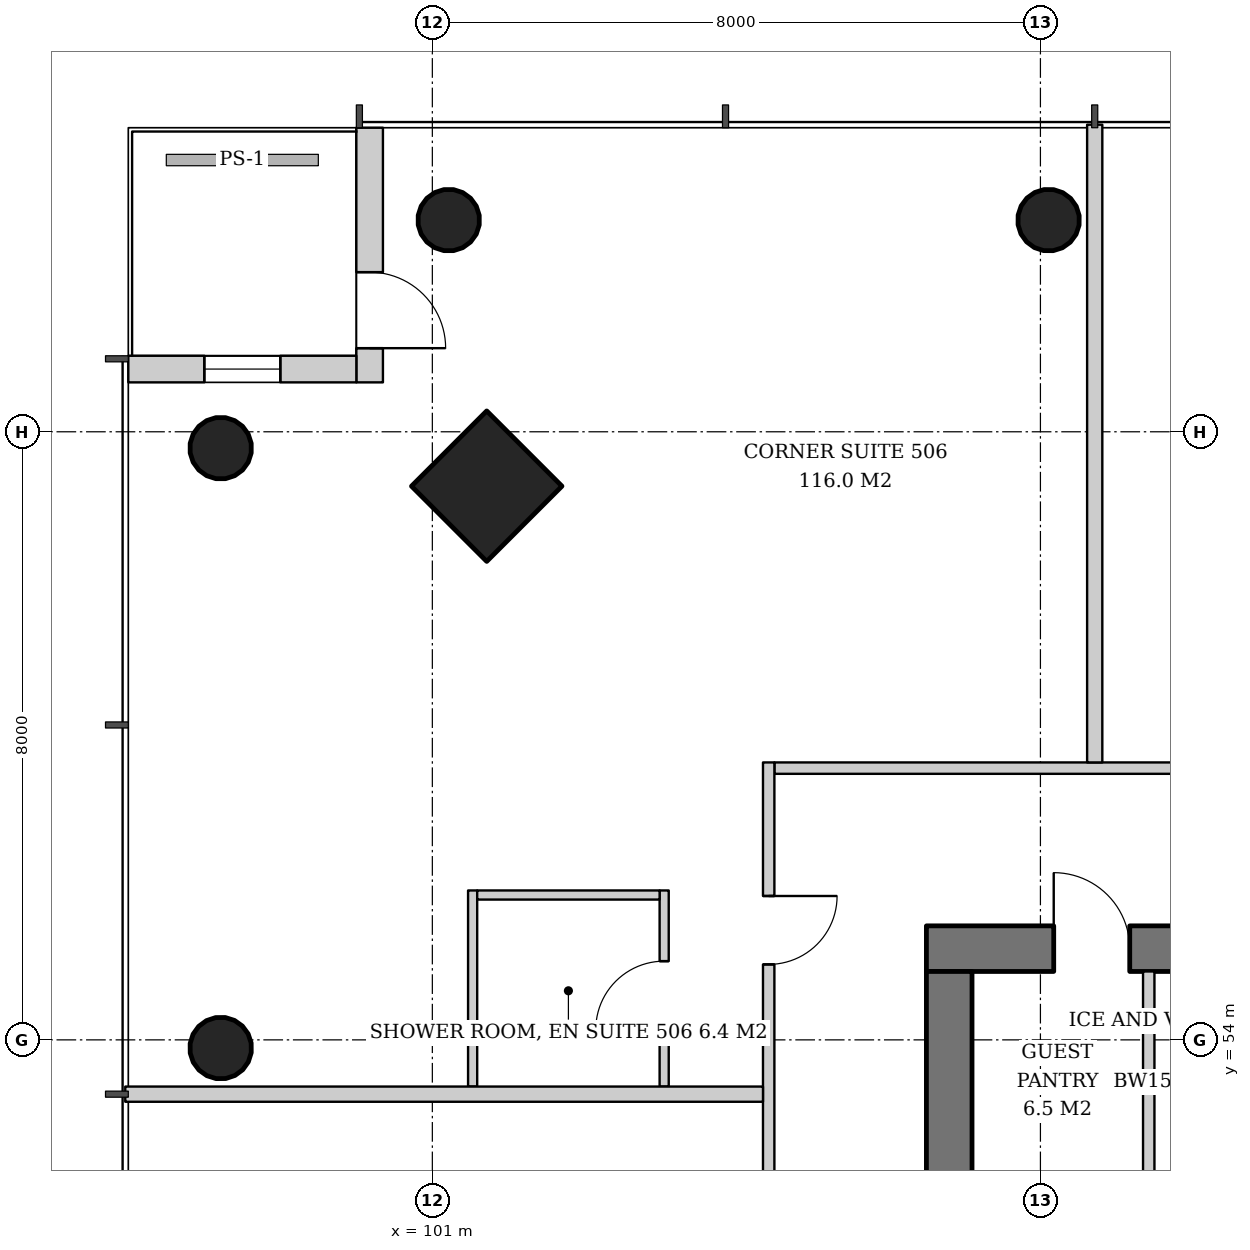
"""IFC4 building model, lengths in metres.
Left out: names, types, materials, properties, quantities, classifications, styles, units other than length and angle.
Written with IfcOpenShell. Run it as: python <this file> out.ifc"""

import sys

from ifc_helpers import new_model, si_unit, direction, frame, frame_2d, origin, origin_2d, place, context, subcontext, project, spatial, rectangle, hollow_circle, extrude, element, fill, save


model = new_model("IFC4")
c1 = context("Model", 3, precision=1e-05, world=origin(), true_north=direction((0.0, 1.0)))
c2 = subcontext(c1, "Body", "Model", "MODEL_VIEW")
j1 = project(units=[si_unit("LENGTHUNIT", "METRE"), si_unit("PLANEANGLEUNIT", "RADIAN")], contexts=[c1])
p1 = place(None, origin())
s1 = spatial("IfcSite", under=j1, at=p1, CompositionType="ELEMENT")
p2 = place(p1, origin())
s2 = spatial("IfcBuilding", under=s1, at=p2, CompositionType="ELEMENT")
p3 = place(p2, frame((0.0, 0.0, 24.8)))
s3 = spatial("IfcBuildingStorey", under=s2, at=p3, CompositionType="ELEMENT", Elevation=24.8)
p4 = place(p3, frame((101.664, 61.336, 0.0), z_axis=(0.043029647111, -0.043029647111, 0.998146732169), x_axis=(0.707106781187, 0.707106781187, 0.0)))
e1 = element("IfcColumn", 1, at=p4, inside=s3, PredefinedType="COLUMN", context=c2, shape_type="SweptSolid", body=[
    extrude(rectangle(XDim=1.4, YDim=1.4, at=origin_2d()), origin(), (0.0, 0.0, 1.0), 3.807),
])
p5 = place(p3, frame((101.164, 64.836, 0.0), z_axis=(0.043029647111, -0.043029647111, 0.998146732169), x_axis=(0.707106781187, 0.707106781187, 0.0)))
e2 = element("IfcColumn", 2, at=p5, inside=s3, PredefinedType="COLUMN", context=c2, shape_type="SweptSolid", body=[
    extrude(hollow_circle(Radius=0.406, WallThickness=0.03, at=origin_2d()), origin(), (0.0, 0.0, 1.0), 3.807),
])
p6 = place(p3, frame((109.082, 64.836, 0.0), z_axis=(0.021561848751, -0.043059525333, 0.998839808957), x_axis=(0.894160516368, 0.44774654769, 0.0)))
e3 = element("IfcColumn", 3, at=p6, inside=s3, PredefinedType="COLUMN", context=c2, shape_type="SweptSolid", body=[
    extrude(hollow_circle(Radius=0.406, WallThickness=0.03, at=origin_2d()), origin(), (0.0, 0.0, 1.0), 3.804),
])
p7 = place(p3, frame((98.164, 61.836, 0.0), z_axis=(0.043029647111, -0.043029647111, 0.998146732169), x_axis=(0.707106781187, 0.707106781187, 0.0)))
e4 = element("IfcColumn", 4, at=p7, inside=s3, PredefinedType="COLUMN", context=c2, shape_type="SweptSolid", body=[
    extrude(hollow_circle(Radius=0.406, WallThickness=0.03, at=origin_2d()), origin(), (0.0, 0.0, 1.0), 3.807),
])
p8 = place(p3, frame((98.164, 53.918, 0.0), z_axis=(0.043059525333, -0.021561848751, 0.998839808957), x_axis=(0.44774654769, 0.894160516368, 0.0)))
e5 = element("IfcColumn", 5, at=p8, inside=s3, PredefinedType="COLUMN", context=c2, shape_type="SweptSolid", body=[
    extrude(hollow_circle(Radius=0.406, WallThickness=0.03, at=origin_2d()), origin(), (0.0, 0.0, 1.0), 3.804),
])
p9 = place(p3, frame((107.5, 55.2, 0.0), z_axis=(0.0, 0.0, 1.0), x_axis=(1.0, 0.0, 0.0)))
e6 = element("IfcWall", 6, at=p9, inside=s3, PredefinedType="SHEAR", context=c2, shape_type="SweptSolid", body=[
    extrude(rectangle(XDim=19.0, YDim=0.6, at=frame_2d((9.5, 0.0))), origin(), (0.0, 0.0, 1.0), 3.8),
])
p10 = place(p9, frame((14.14, 0.0, 0.0)))
e7 = element("IfcOpeningElement", 7, at=p10, cuts=e6, PredefinedType="OPENING", context=c2, shape_type="SweptSolid", body=[
    extrude(rectangle(XDim=1.0, YDim=2.1, at=frame_2d((0.5, 1.05))), frame((0.0, 0.31, 0.0), z_axis=(0.0, -1.0, 0.0), x_axis=(1.0, 0.0, 0.0)), (0.0, 0.0, 1.0), 0.62),
])
p11 = place(p9, frame((1.675, 0.0, 0.0)))
e8 = element("IfcOpeningElement", 8, at=p11, cuts=e6, PredefinedType="OPENING", context=c2, shape_type="SweptSolid", body=[
    extrude(rectangle(XDim=1.0, YDim=2.1, at=frame_2d((0.5, 1.05))), frame((0.0, 0.31, 0.0), z_axis=(0.0, -1.0, 0.0), x_axis=(1.0, 0.0, 0.0)), (0.0, 0.0, 1.0), 0.62),
])
p12 = place(p9, frame((3.587, 0.0, 0.0)))
e9 = element("IfcOpeningElement", 9, at=p12, cuts=e6, PredefinedType="OPENING", context=c2, shape_type="SweptSolid", body=[
    extrude(rectangle(XDim=1.0, YDim=2.1, at=frame_2d((0.5, 1.05))), frame((0.0, 0.31, 0.0), z_axis=(0.0, -1.0, 0.0), x_axis=(1.0, 0.0, 0.0)), (0.0, 0.0, 1.0), 0.62),
])
p13 = place(p3, frame((107.8, 37.1, 0.0), z_axis=(0.0, 0.0, 1.0), x_axis=(0.0, 1.0, 0.0)))
e10 = element("IfcWall", 10, at=p13, inside=s3, PredefinedType="SHEAR", context=c2, shape_type="SweptSolid", body=[
    extrude(rectangle(XDim=17.8, YDim=0.6, at=frame_2d((8.9, 0.0))), origin(), (0.0, 0.0, 1.0), 3.8),
])
p14 = place(p13, frame((8.0, 0.0, 0.0)))
e11 = element("IfcOpeningElement", 11, at=p14, cuts=e10, PredefinedType="OPENING", context=c2, shape_type="SweptSolid", body=[
    extrude(rectangle(XDim=1.8, YDim=2.4, at=frame_2d((0.9, 1.2))), frame((0.0, 0.31, 0.0), z_axis=(0.0, -1.0, 0.0), x_axis=(1.0, 0.0, 0.0)), (0.0, 0.0, 1.0), 0.62),
])
p15 = place(p3, frame((100.175, 66.0, 0.0), z_axis=(0.0, 0.0, 1.0), x_axis=(0.0, -1.0, 0.0)))
e12 = element("IfcWall", 12, at=p15, inside=s3, PredefinedType="SOLIDWALL", context=c2, shape_type="SweptSolid", body=[
    extrude(rectangle(XDim=3.35, YDim=0.35, at=frame_2d((1.675, 0.0))), origin(), (0.0, 0.0, 1.0), 3.6),
])
p16 = place(p15, frame((1.9, 0.0, 0.0)))
e13 = element("IfcOpeningElement", 13, at=p16, cuts=e12, PredefinedType="OPENING", context=c2, shape_type="SweptSolid", body=[
    extrude(rectangle(XDim=1.0, YDim=2.4, at=frame_2d((0.5, 1.2))), frame((0.0, 0.185, 0.0), z_axis=(0.0, -1.0, 0.0), x_axis=(1.0, 0.0, 0.0)), (0.0, 0.0, 1.0), 0.37),
])
p17 = place(p3, frame((100.0, 62.825, 0.0), z_axis=(0.0, 0.0, 1.0), x_axis=(-1.0, 0.0, 0.0)))
e14 = element("IfcWall", 14, at=p17, inside=s3, PredefinedType="SOLIDWALL", context=c2, shape_type="SweptSolid", body=[
    extrude(rectangle(XDim=3.0, YDim=0.35, at=frame_2d((1.5, 0.0))), origin(), (0.0, 0.0, 1.0), 3.6),
])
p18 = place(p17, frame((1.0, 0.0, 0.9)))
e15 = element("IfcOpeningElement", 15, at=p18, cuts=e14, PredefinedType="OPENING", context=c2, shape_type="SweptSolid", body=[
    extrude(rectangle(XDim=1.0, YDim=2.4, at=frame_2d((0.5, 1.2))), frame((0.0, 0.185, 0.0), z_axis=(0.0, -1.0, 0.0), x_axis=(1.0, 0.0, 0.0)), (0.0, 0.0, 1.0), 0.37),
])
p19 = place(p3, frame((110.425, 52.0, 0.0), z_axis=(0.0, 0.0, 1.0), x_axis=(0.0, 1.0, 0.0)))
e16 = element("IfcWall", 16, at=p19, inside=s3, PredefinedType="SOLIDWALL", context=c2, shape_type="SweptSolid", body=[
    extrude(rectangle(XDim=2.9, YDim=0.15, at=frame_2d((1.45, 0.0))), origin(), (0.0, 0.0, 1.0), 3.6),
])
p20 = place(p3, frame((128.65, 57.575, 0.0), z_axis=(0.0, 0.0, 1.0), x_axis=(-1.0, 0.0, 0.0)))
e17 = element("IfcWall", 17, at=p20, inside=s3, PredefinedType="PARTITIONING", context=c2, shape_type="SweptSolid", body=[
    extrude(rectangle(XDim=23.15, YDim=0.15, at=frame_2d((11.575, 0.0))), origin(), (0.0, 0.0, 1.0), 2.8),
])
p21 = place(p20, frame((1.757, 0.0, 0.0)))
e18 = element("IfcOpeningElement", 18, at=p21, cuts=e17, PredefinedType="OPENING", context=c2, shape_type="SweptSolid", body=[
    extrude(rectangle(XDim=0.9, YDim=2.1, at=frame_2d((0.45, 1.05))), frame((0.0, 0.085, 0.0), z_axis=(0.0, -1.0, 0.0), x_axis=(1.0, 0.0, 0.0)), (0.0, 0.0, 1.0), 0.17),
])
p22 = place(p20, frame((5.572, 0.0, 0.0)))
e19 = element("IfcOpeningElement", 19, at=p22, cuts=e17, PredefinedType="OPENING", context=c2, shape_type="SweptSolid", body=[
    extrude(rectangle(XDim=0.9, YDim=2.1, at=frame_2d((0.45, 1.05))), frame((0.0, 0.085, 0.0), z_axis=(0.0, -1.0, 0.0), x_axis=(1.0, 0.0, 0.0)), (0.0, 0.0, 1.0), 0.17),
])
p23 = place(p20, frame((11.921, 0.0, 0.0)))
e20 = element("IfcOpeningElement", 20, at=p23, cuts=e17, PredefinedType="OPENING", context=c2, shape_type="SweptSolid", body=[
    extrude(rectangle(XDim=1.0, YDim=2.1, at=frame_2d((0.5, 1.05))), frame((0.0, 0.085, 0.0), z_axis=(0.0, -1.0, 0.0), x_axis=(1.0, 0.0, 0.0)), (0.0, 0.0, 1.0), 0.17),
])
p24 = place(p3, frame((109.714, 57.65, 0.0), z_axis=(0.0, 0.0, 1.0), x_axis=(0.0, 1.0, 0.0)))
e21 = element("IfcWall", 21, at=p24, inside=s3, PredefinedType="PARTITIONING", context=c2, shape_type="SweptSolid", body=[
    extrude(rectangle(XDim=8.39, YDim=0.2, at=frame_2d((4.195, 0.0))), origin(), (0.0, 0.0, 1.0), 3.05),
])
p25 = place(p3, frame((104.05, 53.386, 0.0), z_axis=(0.0, 0.0, 1.0), x_axis=(0.0, 1.0, 0.0)))
e22 = element("IfcWall", 22, at=p25, inside=s3, PredefinedType="PARTITIONING", context=c2, shape_type="SweptSolid", body=[
    extrude(rectangle(XDim=2.58, YDim=0.12, at=frame_2d((1.29, 0.0))), origin(), (0.0, 0.0, 1.0), 2.8),
])
p26 = place(p25, frame((0.75, 0.0, 0.0)))
e23 = element("IfcOpeningElement", 23, at=p26, cuts=e22, PredefinedType="OPENING", context=c2, shape_type="SweptSolid", body=[
    extrude(rectangle(XDim=0.9, YDim=2.1, at=frame_2d((0.45, 1.05))), frame((0.0, 0.07, 0.0), z_axis=(0.0, -1.0, 0.0), x_axis=(1.0, 0.0, 0.0)), (0.0, 0.0, 1.0), 0.14),
])
p27 = place(p3, frame((101.53, 53.386, 0.0), z_axis=(0.0, 0.0, 1.0), x_axis=(0.0, 1.0, 0.0)))
e24 = element("IfcWall", 24, at=p27, inside=s3, PredefinedType="PARTITIONING", context=c2, shape_type="SweptSolid", body=[
    extrude(rectangle(XDim=2.58, YDim=0.12, at=frame_2d((1.29, 0.0))), origin(), (0.0, 0.0, 1.0), 2.8),
])
p28 = place(p3, frame((103.99, 55.906, 0.0), z_axis=(0.0, 0.0, 1.0), x_axis=(-1.0, 0.0, 0.0)))
e25 = element("IfcWall", 25, at=p28, inside=s3, PredefinedType="PARTITIONING", context=c2, shape_type="SweptSolid", body=[
    extrude(rectangle(XDim=2.4, YDim=0.12, at=frame_2d((1.2, 0.0))), origin(), (0.0, 0.0, 1.0), 2.847),
])
p29 = place(p3, frame((105.425, 57.65, 0.0), z_axis=(0.0, 0.0, 1.0), x_axis=(0.0, -1.0, 0.0)))
e26 = element("IfcWall", 26, at=p29, inside=s3, PredefinedType="PARTITIONING", context=c2, shape_type="SweptSolid", body=[
    extrude(rectangle(XDim=23.15, YDim=0.15, at=frame_2d((11.575, 0.0))), origin(), (0.0, 0.0, 1.0), 2.8),
])
p30 = place(p29, frame((1.757, 0.0, 0.0)))
e27 = element("IfcOpeningElement", 27, at=p30, cuts=e26, PredefinedType="OPENING", context=c2, shape_type="SweptSolid", body=[
    extrude(rectangle(XDim=0.9, YDim=2.1, at=frame_2d((0.45, 1.05))), frame((0.0, 0.085, 0.0), z_axis=(0.0, -1.0, 0.0), x_axis=(1.0, 0.0, 0.0)), (0.0, 0.0, 1.0), 0.17),
])
p31 = place(p29, frame((7.064, 0.0, 0.0)))
e28 = element("IfcOpeningElement", 28, at=p31, cuts=e26, PredefinedType="OPENING", context=c2, shape_type="SweptSolid", body=[
    extrude(rectangle(XDim=1.0, YDim=2.1, at=frame_2d((0.5, 1.05))), frame((0.0, 0.085, 0.0), z_axis=(0.0, -1.0, 0.0), x_axis=(1.0, 0.0, 0.0)), (0.0, 0.0, 1.0), 0.17),
])
p32 = place(p29, frame((10.428, 0.0, 0.0)))
e29 = element("IfcOpeningElement", 29, at=p32, cuts=e26, PredefinedType="OPENING", context=c2, shape_type="SweptSolid", body=[
    extrude(rectangle(XDim=0.9, YDim=2.1, at=frame_2d((0.45, 1.05))), frame((0.0, 0.085, 0.0), z_axis=(0.0, -1.0, 0.0), x_axis=(1.0, 0.0, 0.0)), (0.0, 0.0, 1.0), 0.17),
])
p33 = place(p29, frame((16.829, 0.0, 0.0)))
e30 = element("IfcOpeningElement", 30, at=p33, cuts=e26, PredefinedType="OPENING", context=c2, shape_type="SweptSolid", body=[
    extrude(rectangle(XDim=0.9, YDim=2.1, at=frame_2d((0.45, 1.05))), frame((0.0, 0.085, 0.0), z_axis=(0.0, -1.0, 0.0), x_axis=(1.0, 0.0, 0.0)), (0.0, 0.0, 1.0), 0.17),
])
p34 = place(p3, frame((105.35, 53.286, 0.0), z_axis=(0.0, 0.0, 1.0), x_axis=(-1.0, 0.0, 0.0)))
e31 = element("IfcWall", 31, at=p34, inside=s3, PredefinedType="PARTITIONING", context=c2, shape_type="SweptSolid", body=[
    extrude(rectangle(XDim=8.39, YDim=0.2, at=frame_2d((4.195, 0.0))), origin(), (0.0, 0.0, 1.0), 3.05),
])
p35 = place(p16, origin())
e32 = element("IfcDoor", 32, at=p35, inside=s3, OperationType="SINGLE_SWING_RIGHT", PredefinedType="DOOR", context=c2, shape_type="SweptSolid", body=[
    extrude(rectangle(XDim=1.0, YDim=2.4, at=frame_2d((0.5, 1.2))), frame((0.0, 0.025, 0.0), z_axis=(0.0, -1.0, 0.0), x_axis=(1.0, 0.0, 0.0)), (0.0, 0.0, 1.0), 0.05),
])
fill(e13, e32)
p36 = place(p18, origin())
e33 = element("IfcWindow", 33, at=p36, inside=s3, PartitioningType="SINGLE_PANEL", PredefinedType="WINDOW", context=c2, shape_type="SweptSolid", body=[
    extrude(rectangle(XDim=1.0, YDim=2.4, at=frame_2d((0.5, 1.2))), frame((0.0, 0.03, 0.0), z_axis=(0.0, -1.0, 0.0), x_axis=(1.0, 0.0, 0.0)), (0.0, 0.0, 1.0), 0.06),
])
fill(e15, e33)
p37 = place(p11, origin())
e34 = element("IfcDoor", 34, at=p37, inside=s3, OperationType="SINGLE_SWING_LEFT", PredefinedType="DOOR", context=c2, shape_type="SweptSolid", body=[
    extrude(rectangle(XDim=1.0, YDim=2.1, at=frame_2d((0.5, 1.05))), frame((0.0, -0.24, 0.0), z_axis=(0.0, -1.0, 0.0), x_axis=(1.0, 0.0, 0.0)), (0.0, 0.0, 1.0), 0.05),
])
fill(e8, e34)
p38 = place(p26, origin())
e35 = element("IfcDoor", 35, at=p38, inside=s3, OperationType="SINGLE_SWING_LEFT", PredefinedType="DOOR", context=c2, shape_type="SweptSolid", body=[
    extrude(rectangle(XDim=0.9, YDim=2.1, at=frame_2d((0.45, 1.05))), frame((0.0, 0.025, 0.0), z_axis=(0.0, -1.0, 0.0), x_axis=(1.0, 0.0, 0.0)), (0.0, 0.0, 1.0), 0.05),
])
fill(e23, e35)
p39 = place(p30, origin())
e36 = element("IfcDoor", 36, at=p39, inside=s3, OperationType="SINGLE_SWING_LEFT", PredefinedType="DOOR", context=c2, shape_type="SweptSolid", body=[
    extrude(rectangle(XDim=0.9, YDim=2.1, at=frame_2d((0.45, 1.05))), frame((0.0, 0.025, 0.0), z_axis=(0.0, -1.0, 0.0), x_axis=(1.0, 0.0, 0.0)), (0.0, 0.0, 1.0), 0.05),
])
fill(e27, e36)
save(model, sys.argv[1])
